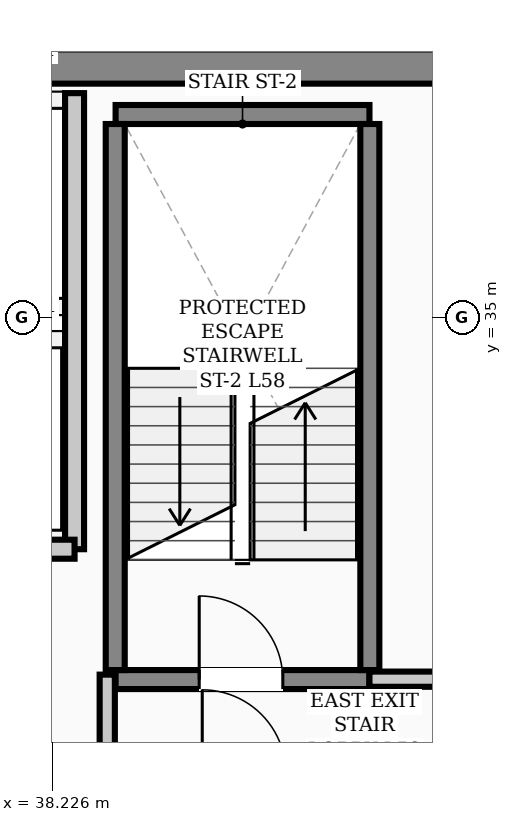
"""IFC4 building model, lengths in metres.
Left out: names, types, materials, properties, quantities, classifications, styles, units other than length and angle.
Written with IfcOpenShell. Run it as: python <this file> out.ifc"""

import sys

from ifc_helpers import new_model, si_unit, direction, frame, frame_2d, origin, place, context, subcontext, project, spatial, rectangle, extrude, element, fill, save


model = new_model("IFC4")
c1 = context("Model", 3, precision=1e-05, world=origin(), true_north=direction((0.0, 1.0)))
c2 = subcontext(c1, "Body", "Model", "MODEL_VIEW")
j1 = project(units=[si_unit("LENGTHUNIT", "METRE"), si_unit("PLANEANGLEUNIT", "RADIAN")], contexts=[c1])
p1 = place(None, origin())
s1 = spatial("IfcSite", under=j1, at=p1, CompositionType="ELEMENT")
p2 = place(p1, origin())
s2 = spatial("IfcBuilding", under=s1, at=p2, CompositionType="ELEMENT")
p3 = place(p2, frame((0.0, 0.0, 234.5)))
s3 = spatial("IfcBuildingStorey", under=s2, at=p3, CompositionType="ELEMENT", Elevation=234.5)
p4 = place(p3, frame((13.5, 38.3, 0.0), z_axis=(0.0, 0.0, 1.0), x_axis=(1.0, 0.0, 0.0)))
e1 = element("IfcWall", 1, at=p4, inside=s3, PredefinedType="SHEAR", context=c2, shape_type="SweptSolid", body=[
    extrude(rectangle(XDim=30.5, YDim=0.45, at=frame_2d((15.25, 0.0))), origin(), (0.0, 0.0, 1.0), 3.72),
])
p5 = place(p3, frame((39.06, 30.235, 0.0), z_axis=(0.0, 0.0, 1.0), x_axis=(1.0, 0.0, 0.0)))
e2 = element("IfcWall", 2, at=p5, inside=s3, PredefinedType="STANDARD", context=c2, shape_type="SweptSolid", body=[
    extrude(rectangle(XDim=3.34, YDim=0.25, at=frame_2d((1.67, 0.0))), origin(), (0.0, 0.0, 1.0), 3.72),
])
p6 = place(p5, frame((1.1, 0.0, 0.0)))
e3 = element("IfcOpeningElement", 3, at=p6, cuts=e2, PredefinedType="OPENING", context=c2, shape_type="SweptSolid", body=[
    extrude(rectangle(XDim=1.1, YDim=2.08, at=frame_2d((0.55, 1.04))), frame((0.0, 0.135, 0.0), z_axis=(0.0, -1.0, 0.0), x_axis=(1.0, 0.0, 0.0)), (0.0, 0.0, 1.0), 0.27),
])
p7 = place(p3, frame((39.06, 37.669, 0.0), z_axis=(0.0, 0.0, 1.0), x_axis=(1.0, 0.0, 0.0)))
e4 = element("IfcWall", 4, at=p7, inside=s3, PredefinedType="STANDARD", context=c2, shape_type="SweptSolid", body=[
    extrude(rectangle(XDim=3.34, YDim=0.25, at=frame_2d((1.67, 0.0))), origin(), (0.0, 0.0, 1.0), 3.72),
])
for number, where, z_axis, x_axis in (
    (5, (39.055, 30.36, 0.0), (0.0, 0.0, 1.0), (0.0, 1.0, 0.0)),
    (6, (42.405, 30.36, 0.0), (0.0, 0.0, 1.0), (0.0, 1.0, 0.0)),
):
    element("IfcWall", number, at=place(p3, frame(where, z_axis=z_axis, x_axis=x_axis)), inside=s3, PredefinedType="STANDARD", context=c2, shape_type="SweptSolid", body=[
        extrude(rectangle(XDim=7.184, YDim=0.25, at=frame_2d((3.592, 0.0))), origin(), (0.0, 0.0, 1.0), 3.72),
    ])
p8 = place(p3, frame((38.52, 31.95, 0.0), z_axis=(0.0, 0.0, 1.0), x_axis=(0.0, 1.0, 0.0)))
e7 = element("IfcWall", 7, at=p8, inside=s3, PredefinedType="STANDARD", context=c2, shape_type="SweptSolid", body=[
    extrude(rectangle(XDim=6.0, YDim=0.25, at=frame_2d((3.0, 0.0))), origin(), (0.0, 0.0, 1.0), 3.48),
])
p9 = place(p3, frame((36.62, 31.95, 0.0), z_axis=(0.0, 0.0, 1.0), x_axis=(1.0, 0.0, 0.0)))
e8 = element("IfcWall", 8, at=p9, inside=s3, PredefinedType="STANDARD", context=c2, shape_type="SweptSolid", body=[
    extrude(rectangle(XDim=1.9, YDim=0.25, at=frame_2d((0.95, 0.0))), origin(), (0.0, 0.0, 1.0), 3.48),
])
p10 = place(p3, frame((42.4, 30.24, 0.0), z_axis=(0.0, 0.0, 1.0), x_axis=(1.0, 0.0, 0.0)))
e9 = element("IfcWall", 9, at=p10, inside=s3, PredefinedType="STANDARD", context=c2, shape_type="SweptSolid", body=[
    extrude(rectangle(XDim=1.365, YDim=0.2, at=frame_2d((0.683, 0.0))), origin(), (0.0, 0.0, 1.0), 3.72),
])
p11 = place(p3, frame((38.95, 29.235, 0.0), z_axis=(0.0, 0.0, 1.0), x_axis=(0.0, 1.0, 0.0)))
e10 = element("IfcWall", 10, at=p11, inside=s3, PredefinedType="STANDARD", context=c2, shape_type="SweptSolid", body=[
    extrude(rectangle(XDim=1.065, YDim=0.2, at=frame_2d((0.532, 0.0))), origin(), (0.0, 0.0, 1.0), 3.72),
])
p12 = place(p6, origin())
e11 = element("IfcDoor", 11, at=p12, inside=s3, OperationType="SINGLE_SWING_LEFT", PredefinedType="DOOR", context=c2, shape_type="SweptSolid", body=[
    extrude(rectangle(XDim=1.1, YDim=2.08, at=frame_2d((0.55, 1.04))), frame((0.0, 0.025, 0.0), z_axis=(0.0, -1.0, 0.0), x_axis=(1.0, 0.0, 0.0)), (0.0, 0.0, 1.0), 0.05),
])
fill(e3, e11)
save(model, sys.argv[1])
